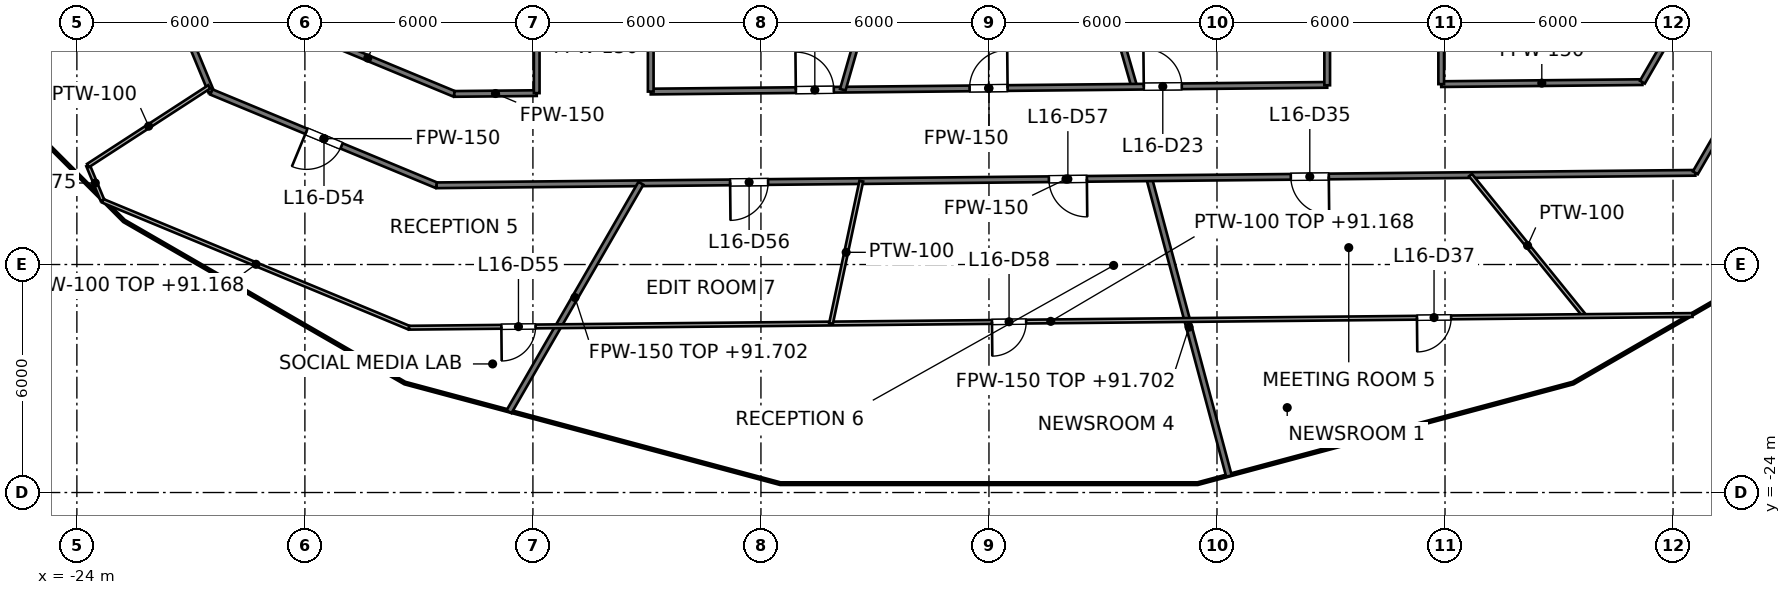
"""IFC4 building model, lengths in metres.
Left out: names, types, materials, properties, quantities, classifications, styles, units other than length and angle.
Written with IfcOpenShell. Run it as: python <this file> out.ifc"""

import sys

from ifc_helpers import new_model, si_unit, direction, frame, frame_2d, origin, place, context, subcontext, project, spatial, rectangle, extrude, element, fill, save


model = new_model("IFC4")
c1 = context("Model", 3, precision=1e-05, world=origin(), true_north=direction((0.0, 1.0)))
c2 = subcontext(c1, "Body", "Model", "MODEL_VIEW")
j1 = project(units=[si_unit("LENGTHUNIT", "METRE"), si_unit("PLANEANGLEUNIT", "RADIAN")], contexts=[c1])
p1 = place(None, origin())
s1 = spatial("IfcSite", under=j1, at=p1, CompositionType="ELEMENT")
p2 = place(p1, origin())
s2 = spatial("IfcBuilding", under=s1, at=p2, CompositionType="ELEMENT")
p3 = place(p2, frame((0.0, 0.0, 88.2)))
s3 = spatial("IfcBuildingStorey", under=s2, at=p3, CompositionType="ELEMENT", Elevation=88.2)
p4 = place(p3, frame((4.215, -15.73, 0.0), z_axis=(0.0, 0.0, 1.0), x_axis=(0.258844392232, -0.96591903419, 0.0)))
e1 = element("IfcWall", 1, at=p4, inside=s3, PredefinedType="PARTITIONING", context=c2, shape_type="SweptSolid", body=[
    extrude(rectangle(XDim=8.112, YDim=0.15, at=frame_2d((4.056, 0.0))), origin(), (0.0, 0.0, 1.0), 3.502),
])
p5 = place(p3, frame((2.296, -8.0, 0.0), z_axis=(0.0, 0.0, 1.0), x_axis=(0.275935525478, -0.961176147113, 0.0)))
e2 = element("IfcWall", 2, at=p5, inside=s3, PredefinedType="PARTITIONING", context=c2, shape_type="SweptSolid", body=[
    extrude(rectangle(XDim=5.548, YDim=0.15, at=frame_2d((2.774, 0.0))), origin(), (0.0, 0.0, 1.0), 3.9),
])
p6 = place(p3, frame((-22.9, -7.572, 0.0), z_axis=(0.0, 0.0, 1.0), x_axis=(0.382367581622, -0.924010298928, 0.0)))
e3 = element("IfcWall", 3, at=p6, inside=s3, PredefinedType="PARTITIONING", context=c2, shape_type="SweptSolid", body=[
    extrude(rectangle(XDim=6.374, YDim=0.15, at=frame_2d((3.187, 0.0))), origin(), (0.0, 0.0, 1.0), 2.977),
])
p7 = place(p6, frame((2.6, 0.0, 0.0)))
e4 = element("IfcOpeningElement", 4, at=p7, cuts=e3, PredefinedType="OPENING", context=c2, shape_type="SweptSolid", body=[
    extrude(rectangle(XDim=1.0, YDim=2.1, at=frame_2d((0.5, 1.05))), frame((0.0, 0.075, 0.0), z_axis=(0.0, -1.0, 0.0), x_axis=(1.0, 0.0, 0.0)), (0.0, 0.0, 1.0), 0.15),
])
p8 = place(p3, frame((-20.46, -13.46, 0.0), z_axis=(0.0, 0.0, 1.0), x_axis=(0.923801547606, -0.382871650349, 0.0)))
e5 = element("IfcWall", 5, at=p8, inside=s3, PredefinedType="PARTITIONING", context=c2, shape_type="SweptSolid", body=[
    extrude(rectangle(XDim=6.415, YDim=0.15, at=frame_2d((3.208, 0.0))), origin(), (0.0, 0.0, 1.0), 2.968),
])
p9 = place(p8, frame((2.707, 0.0, 0.0)))
e6 = element("IfcOpeningElement", 6, at=p9, cuts=e5, PredefinedType="OPENING", context=c2, shape_type="SweptSolid", body=[
    extrude(rectangle(XDim=1.0, YDim=2.1, at=frame_2d((0.5, 1.05))), frame((0.0, 0.075, 0.0), z_axis=(0.0, -1.0, 0.0), x_axis=(1.0, 0.0, 0.0)), (0.0, 0.0, 1.0), 0.15),
])
p10 = place(p3, frame((-18.623, -11.623, 0.0), z_axis=(0.0, 0.0, 1.0), x_axis=(0.923791670587, -0.38289548098, 0.0)))
e7 = element("IfcWall", 7, at=p10, inside=s3, PredefinedType="PARTITIONING", context=c2, shape_type="SweptSolid", body=[
    extrude(rectangle(XDim=4.931, YDim=0.15, at=frame_2d((2.465, 0.0))), origin(), (0.0, 0.0, 1.0), 2.968),
])
p11 = place(p3, frame((-14.534, -15.916, 0.0), z_axis=(0.0, 0.0, 1.0), x_axis=(0.999950930262, 0.009906415532, 0.0)))
e8 = element("IfcWall", 8, at=p11, inside=s3, PredefinedType="PARTITIONING", context=c2, shape_type="SweptSolid", body=[
    extrude(rectangle(XDim=33.123, YDim=0.15, at=frame_2d((16.561, 0.0))), origin(), (0.0, 0.0, 1.0), 2.968),
])
p12 = place(p11, frame((22.477, 0.0, 0.0)))
e9 = element("IfcOpeningElement", 9, at=p12, cuts=e8, PredefinedType="OPENING", context=c2, shape_type="SweptSolid", body=[
    extrude(rectangle(XDim=1.0, YDim=2.1, at=frame_2d((0.5, 1.05))), frame((0.0, 0.075, 0.0), z_axis=(0.0, -1.0, 0.0), x_axis=(1.0, 0.0, 0.0)), (0.0, 0.0, 1.0), 0.15),
])
p13 = place(p11, frame((7.723, 0.0, 0.0)))
e10 = element("IfcOpeningElement", 10, at=p13, cuts=e8, PredefinedType="OPENING", context=c2, shape_type="SweptSolid", body=[
    extrude(rectangle(XDim=1.0, YDim=2.1, at=frame_2d((0.5, 1.05))), frame((0.0, 0.075, 0.0), z_axis=(0.0, -1.0, 0.0), x_axis=(1.0, 0.0, 0.0)), (0.0, 0.0, 1.0), 0.15),
])
p14 = place(p11, frame((16.111, 0.0, 0.0)))
e11 = element("IfcOpeningElement", 11, at=p14, cuts=e8, PredefinedType="OPENING", context=c2, shape_type="SweptSolid", body=[
    extrude(rectangle(XDim=1.0, YDim=2.1, at=frame_2d((0.5, 1.05))), frame((0.0, 0.075, 0.0), z_axis=(0.0, -1.0, 0.0), x_axis=(1.0, 0.0, 0.0)), (0.0, 0.0, 1.0), 0.15),
])
p15 = place(p3, frame((-14.068, -13.511, 0.0), z_axis=(0.0, 0.0, 1.0), x_axis=(0.999950911515, 0.009908307647, 0.0)))
e12 = element("IfcWall", 12, at=p15, inside=s3, PredefinedType="PARTITIONING", context=c2, shape_type="SweptSolid", body=[
    extrude(rectangle(XDim=2.168, YDim=0.15, at=frame_2d((1.084, 0.0))), origin(), (0.0, 0.0, 1.0), 2.968),
])
p16 = place(p3, frame((-8.9, -13.449, 0.0), z_axis=(0.0, 0.0, 1.0), x_axis=(0.999950834077, 0.009916119672, 0.0)))
e13 = element("IfcWall", 13, at=p16, inside=s3, PredefinedType="PARTITIONING", context=c2, shape_type="SweptSolid", body=[
    extrude(rectangle(XDim=17.801, YDim=0.15, at=frame_2d((8.9, 0.0))), origin(), (0.0, 0.0, 1.0), 2.968),
])
p17 = place(p16, frame((3.818, 0.0, 0.0)))
e14 = element("IfcOpeningElement", 14, at=p17, cuts=e13, PredefinedType="OPENING", context=c2, shape_type="SweptSolid", body=[
    extrude(rectangle(XDim=1.0, YDim=2.1, at=frame_2d((0.5, 1.05))), frame((0.0, 0.075, 0.0), z_axis=(0.0, -1.0, 0.0), x_axis=(1.0, 0.0, 0.0)), (0.0, 0.0, 1.0), 0.15),
])
p18 = place(p16, frame((8.391, 0.0, 0.0)))
e15 = element("IfcOpeningElement", 15, at=p18, cuts=e13, PredefinedType="OPENING", context=c2, shape_type="SweptSolid", body=[
    extrude(rectangle(XDim=1.0, YDim=2.1, at=frame_2d((0.5, 1.05))), frame((0.0, 0.075, 0.0), z_axis=(0.0, -1.0, 0.0), x_axis=(1.0, 0.0, 0.0)), (0.0, 0.0, 1.0), 0.15),
])
p19 = place(p16, frame((12.975, 0.0, 0.0)))
e16 = element("IfcOpeningElement", 16, at=p19, cuts=e13, PredefinedType="OPENING", context=c2, shape_type="SweptSolid", body=[
    extrude(rectangle(XDim=1.0, YDim=2.1, at=frame_2d((0.5, 1.05))), frame((0.0, 0.075, 0.0), z_axis=(0.0, -1.0, 0.0), x_axis=(1.0, 0.0, 0.0)), (0.0, 0.0, 1.0), 0.15),
])
p20 = place(p3, frame((11.9, -13.253, 0.0), z_axis=(0.0, 0.0, 1.0), x_axis=(0.999950853109, 0.009914200296, 0.0)))
e17 = element("IfcWall", 17, at=p20, inside=s3, PredefinedType="PARTITIONING", context=c2, shape_type="SweptSolid", body=[
    extrude(rectangle(XDim=5.294, YDim=0.15, at=frame_2d((2.647, 0.0))), origin(), (0.0, 0.0, 1.0), 2.968),
])
p21 = place(p3, frame((18.587, -15.587, 0.0), z_axis=(0.0, 0.0, 1.0), x_axis=(0.500026433136, 0.866010142069, 0.0)))
e18 = element("IfcWall", 18, at=p21, inside=s3, PredefinedType="PARTITIONING", context=c2, shape_type="SweptSolid", body=[
    extrude(rectangle(XDim=8.713, YDim=0.15, at=frame_2d((4.357, 0.0))), origin(), (0.0, 0.0, 1.0), 2.968),
])
p22 = place(p21, frame((3.807, 0.0, 0.0)))
e19 = element("IfcOpeningElement", 19, at=p22, cuts=e18, PredefinedType="OPENING", context=c2, shape_type="SweptSolid", body=[
    extrude(rectangle(XDim=1.0, YDim=2.1, at=frame_2d((0.5, 1.05))), frame((0.0, 0.075, 0.0), z_axis=(0.0, -1.0, 0.0), x_axis=(1.0, 0.0, 0.0)), (0.0, 0.0, 1.0), 0.15),
])
p23 = place(p3, frame((17.194, -13.201, 0.0), z_axis=(0.0, 0.0, 1.0), x_axis=(0.50001062018, 0.866019272134, 0.0)))
e20 = element("IfcWall", 20, at=p23, inside=s3, PredefinedType="PARTITIONING", context=c2, shape_type="SweptSolid", body=[
    extrude(rectangle(XDim=6.674, YDim=0.15, at=frame_2d((3.337, 0.0))), origin(), (0.0, 0.0, 1.0), 2.968),
])
p24 = place(p23, frame((2.833, 0.0, 0.0)))
e21 = element("IfcOpeningElement", 21, at=p24, cuts=e20, PredefinedType="OPENING", context=c2, shape_type="SweptSolid", body=[
    extrude(rectangle(XDim=1.0, YDim=2.1, at=frame_2d((0.5, 1.05))), frame((0.0, 0.075, 0.0), z_axis=(0.0, -1.0, 0.0), x_axis=(1.0, 0.0, 0.0)), (0.0, 0.0, 1.0), 0.15),
])
p25 = place(p3, frame((-12.629, -21.874, 0.0), z_axis=(0.0, 0.0, 1.0), x_axis=(0.499986326517, 0.86603329803, 0.0)))
e22 = element("IfcWall", 22, at=p25, inside=s3, PredefinedType="PARTITIONING", context=c2, shape_type="SweptSolid", body=[
    extrude(rectangle(XDim=6.941, YDim=0.15, at=frame_2d((3.471, 0.0))), origin(), (0.0, 0.0, 1.0), 3.502),
])
p26 = place(p3, frame((-3.846, -13.399, 0.0), z_axis=(0.0, 0.0, 1.0), x_axis=(0.275914969745, 0.961182048038, 0.0)))
e23 = element("IfcWall", 23, at=p26, inside=s3, PredefinedType="PARTITIONING", context=c2, shape_type="SweptSolid", body=[
    extrude(rectangle(XDim=5.617, YDim=0.15, at=frame_2d((2.809, 0.0))), origin(), (0.0, 0.0, 1.0), 3.9),
])
p27 = place(p3, frame((11.9, -13.253, 0.0), z_axis=(0.0, 0.0, 1.0), x_axis=(0.0, 1.0, 0.0)))
e24 = element("IfcWall", 24, at=p27, inside=s3, PredefinedType="PARTITIONING", context=c2, shape_type="SweptSolid", body=[
    extrude(rectangle(XDim=5.253, YDim=0.15, at=frame_2d((2.626, 0.0))), origin(), (0.0, 0.0, 1.0), 2.968),
])
p28 = place(p3, frame((8.9, -13.283, 0.0), z_axis=(0.0, 0.0, 1.0), x_axis=(0.0, 1.0, 0.0)))
e25 = element("IfcWall", 25, at=p28, inside=s3, PredefinedType="PARTITIONING", context=c2, shape_type="SweptSolid", body=[
    extrude(rectangle(XDim=5.283, YDim=0.15, at=frame_2d((2.642, 0.0))), origin(), (0.0, 0.0, 1.0), 2.968),
])
p29 = place(p3, frame((-8.9, -13.449, 0.0), z_axis=(0.0, 0.0, 1.0), x_axis=(0.0, 1.0, 0.0)))
e26 = element("IfcWall", 26, at=p29, inside=s3, PredefinedType="PARTITIONING", context=c2, shape_type="SweptSolid", body=[
    extrude(rectangle(XDim=5.449, YDim=0.15, at=frame_2d((2.725, 0.0))), origin(), (0.0, 0.0, 1.0), 2.968),
])
p30 = place(p3, frame((-11.9, -13.49, 0.0), z_axis=(0.0, 0.0, 1.0), x_axis=(0.0, 1.0, 0.0)))
e27 = element("IfcWall", 27, at=p30, inside=s3, PredefinedType="PARTITIONING", context=c2, shape_type="SweptSolid", body=[
    extrude(rectangle(XDim=5.49, YDim=0.15, at=frame_2d((2.745, 0.0))), origin(), (0.0, 0.0, 1.0), 2.968),
])
p31 = place(p30, frame((2.245, 0.0, 0.0)))
e28 = element("IfcOpeningElement", 28, at=p31, cuts=e27, PredefinedType="OPENING", context=c2, shape_type="SweptSolid", body=[
    extrude(rectangle(XDim=1.0, YDim=2.1, at=frame_2d((0.5, 1.05))), frame((0.0, 0.075, 0.0), z_axis=(0.0, -1.0, 0.0), x_axis=(1.0, 0.0, 0.0)), (0.0, 0.0, 1.0), 0.15),
])
p32 = place(p3, frame((-23.706, -15.395, 0.0), z_axis=(0.0, 0.0, 1.0), x_axis=(0.382734348683, -0.923858440638, 0.0)))
e29 = element("IfcWall", 29, at=p32, inside=s3, PredefinedType="PARTITIONING", context=c2, shape_type="SweptSolid", body=[
    extrude(rectangle(XDim=0.996, YDim=0.1, at=frame_2d((0.498, 0.0))), origin(), (0.0, 0.0, 1.0), 3.675),
])
p33 = place(p3, frame((12.67, -15.646, 0.0), z_axis=(0.0, 0.0, 1.0), x_axis=(0.629429152062, -0.777057875923, 0.0)))
e30 = element("IfcWall", 30, at=p33, inside=s3, PredefinedType="PARTITIONING", context=c2, shape_type="SweptSolid", body=[
    extrude(rectangle(XDim=4.774, YDim=0.1, at=frame_2d((2.387, 0.0))), origin(), (0.0, 0.0, 1.0), 3.9),
])
p34 = place(p3, frame((-23.315, -16.325, 0.0), z_axis=(0.0, 0.0, 1.0), x_axis=(0.923811686722, -0.382847185541, 0.0)))
e31 = element("IfcWall", 31, at=p34, inside=s3, PredefinedType="PARTITIONING", context=c2, shape_type="SweptSolid", body=[
    extrude(rectangle(XDim=8.719, YDim=0.1, at=frame_2d((4.36, 0.0))), origin(), (0.0, 0.0, 1.0), 2.968),
])
p35 = place(p3, frame((-15.26, -19.663, 0.0), z_axis=(0.0, 0.0, 1.0), x_axis=(0.999951032014, 0.009896139397, 0.0)))
e32 = element("IfcWall", 32, at=p35, inside=s3, PredefinedType="PARTITIONING", context=c2, shape_type="SweptSolid", body=[
    extrude(rectangle(XDim=33.774, YDim=0.1, at=frame_2d((16.887, 0.0))), origin(), (0.0, 0.0, 1.0), 2.968),
])
p36 = place(p35, frame((26.523, 0.0, 0.0)))
e33 = element("IfcOpeningElement", 33, at=p36, cuts=e32, PredefinedType="OPENING", context=c2, shape_type="SweptSolid", body=[
    extrude(rectangle(XDim=0.9, YDim=2.1, at=frame_2d((0.45, 1.05))), frame((0.0, 0.05, 0.0), z_axis=(0.0, -1.0, 0.0), x_axis=(1.0, 0.0, 0.0)), (0.0, 0.0, 1.0), 0.1),
])
p37 = place(p35, frame((2.43, 0.0, 0.0)))
e34 = element("IfcOpeningElement", 34, at=p37, cuts=e32, PredefinedType="OPENING", context=c2, shape_type="SweptSolid", body=[
    extrude(rectangle(XDim=0.9, YDim=2.1, at=frame_2d((0.45, 1.05))), frame((0.0, 0.05, 0.0), z_axis=(0.0, -1.0, 0.0), x_axis=(1.0, 0.0, 0.0)), (0.0, 0.0, 1.0), 0.1),
])
p38 = place(p35, frame((15.34, 0.0, 0.0)))
e35 = element("IfcOpeningElement", 35, at=p38, cuts=e32, PredefinedType="OPENING", context=c2, shape_type="SweptSolid", body=[
    extrude(rectangle(XDim=0.9, YDim=2.1, at=frame_2d((0.45, 1.05))), frame((0.0, 0.05, 0.0), z_axis=(0.0, -1.0, 0.0), x_axis=(1.0, 0.0, 0.0)), (0.0, 0.0, 1.0), 0.1),
])
p39 = place(p3, frame((-23.706, -15.395, 0.0), z_axis=(0.0, 0.0, 1.0), x_axis=(0.838733884708, 0.544541523341, 0.0)))
e36 = element("IfcWall", 36, at=p39, inside=s3, PredefinedType="PARTITIONING", context=c2, shape_type="SweptSolid", body=[
    extrude(rectangle(XDim=3.803, YDim=0.1, at=frame_2d((1.902, 0.0))), origin(), (0.0, 0.0, 1.0), 3.9),
])
p40 = place(p3, frame((-4.156, -19.553, 0.0), z_axis=(0.0, 0.0, 1.0), x_axis=(0.208023345905, 0.978123861052, 0.0)))
e37 = element("IfcWall", 37, at=p40, inside=s3, PredefinedType="PARTITIONING", context=c2, shape_type="SweptSolid", body=[
    extrude(rectangle(XDim=3.832, YDim=0.1, at=frame_2d((1.916, 0.0))), origin(), (0.0, 0.0, 1.0), 3.9),
])
p41 = place(p17, origin())
e38 = element("IfcDoor", 38, at=p41, inside=s3, OperationType="SINGLE_SWING_LEFT", PredefinedType="DOOR", context=c2, shape_type="SweptSolid", body=[
    extrude(rectangle(XDim=1.0, YDim=2.1, at=frame_2d((0.5, 1.05))), frame((0.0, 0.025, 0.0), z_axis=(0.0, -1.0, 0.0), x_axis=(1.0, 0.0, 0.0)), (0.0, 0.0, 1.0), 0.05),
])
fill(e14, e38)
p42 = place(p18, origin())
e39 = element("IfcDoor", 39, at=p42, inside=s3, OperationType="SINGLE_SWING_RIGHT", PredefinedType="DOOR", context=c2, shape_type="SweptSolid", body=[
    extrude(rectangle(XDim=1.0, YDim=2.1, at=frame_2d((0.5, 1.05))), frame((0.0, 0.025, 0.0), z_axis=(0.0, -1.0, 0.0), x_axis=(1.0, 0.0, 0.0)), (0.0, 0.0, 1.0), 0.05),
])
fill(e15, e39)
p43 = place(p19, origin())
e40 = element("IfcDoor", 40, at=p43, inside=s3, OperationType="SINGLE_SWING_LEFT", PredefinedType="DOOR", context=c2, shape_type="SweptSolid", body=[
    extrude(rectangle(XDim=1.0, YDim=2.1, at=frame_2d((0.5, 1.05))), frame((0.0, 0.025, 0.0), z_axis=(0.0, -1.0, 0.0), x_axis=(1.0, 0.0, 0.0)), (0.0, 0.0, 1.0), 0.05),
])
fill(e16, e40)
p44 = place(p12, origin())
e41 = element("IfcDoor", 41, at=p44, inside=s3, OperationType="SINGLE_SWING_RIGHT", PredefinedType="DOOR", context=c2, shape_type="SweptSolid", body=[
    extrude(rectangle(XDim=1.0, YDim=2.1, at=frame_2d((0.5, 1.05))), frame((0.0, 0.025, 0.0), z_axis=(0.0, -1.0, 0.0), x_axis=(1.0, 0.0, 0.0)), (0.0, 0.0, 1.0), 0.05),
])
fill(e9, e41)
p45 = place(p36, origin())
e42 = element("IfcDoor", 42, at=p45, inside=s3, OperationType="SINGLE_SWING_LEFT", PredefinedType="DOOR", context=c2, shape_type="SweptSolid", body=[
    extrude(rectangle(XDim=0.9, YDim=2.1, at=frame_2d((0.45, 1.05))), frame((0.0, 0.025, 0.0), z_axis=(0.0, -1.0, 0.0), x_axis=(1.0, 0.0, 0.0)), (0.0, 0.0, 1.0), 0.05),
])
fill(e33, e42)
p46 = place(p9, origin())
e43 = element("IfcDoor", 43, at=p46, inside=s3, OperationType="SINGLE_SWING_LEFT", PredefinedType="DOOR", context=c2, shape_type="SweptSolid", body=[
    extrude(rectangle(XDim=1.0, YDim=2.1, at=frame_2d((0.5, 1.05))), frame((0.0, 0.025, 0.0), z_axis=(0.0, -1.0, 0.0), x_axis=(1.0, 0.0, 0.0)), (0.0, 0.0, 1.0), 0.05),
])
fill(e6, e43)
p47 = place(p37, origin())
e44 = element("IfcDoor", 44, at=p47, inside=s3, OperationType="SINGLE_SWING_LEFT", PredefinedType="DOOR", context=c2, shape_type="SweptSolid", body=[
    extrude(rectangle(XDim=0.9, YDim=2.1, at=frame_2d((0.45, 1.05))), frame((0.0, 0.025, 0.0), z_axis=(0.0, -1.0, 0.0), x_axis=(1.0, 0.0, 0.0)), (0.0, 0.0, 1.0), 0.05),
])
fill(e34, e44)
p48 = place(p13, origin())
e45 = element("IfcDoor", 45, at=p48, inside=s3, OperationType="SINGLE_SWING_LEFT", PredefinedType="DOOR", context=c2, shape_type="SweptSolid", body=[
    extrude(rectangle(XDim=1.0, YDim=2.1, at=frame_2d((0.5, 1.05))), frame((0.0, 0.025, 0.0), z_axis=(0.0, -1.0, 0.0), x_axis=(1.0, 0.0, 0.0)), (0.0, 0.0, 1.0), 0.05),
])
fill(e10, e45)
p49 = place(p14, origin())
e46 = element("IfcDoor", 46, at=p49, inside=s3, OperationType="SINGLE_SWING_RIGHT", PredefinedType="DOOR", context=c2, shape_type="SweptSolid", body=[
    extrude(rectangle(XDim=1.0, YDim=2.1, at=frame_2d((0.5, 1.05))), frame((0.0, 0.025, 0.0), z_axis=(0.0, -1.0, 0.0), x_axis=(1.0, 0.0, 0.0)), (0.0, 0.0, 1.0), 0.05),
])
fill(e11, e46)
p50 = place(p38, origin())
e47 = element("IfcDoor", 47, at=p50, inside=s3, OperationType="SINGLE_SWING_LEFT", PredefinedType="DOOR", context=c2, shape_type="SweptSolid", body=[
    extrude(rectangle(XDim=0.9, YDim=2.1, at=frame_2d((0.45, 1.05))), frame((0.0, 0.025, 0.0), z_axis=(0.0, -1.0, 0.0), x_axis=(1.0, 0.0, 0.0)), (0.0, 0.0, 1.0), 0.05),
])
fill(e35, e47)
save(model, sys.argv[1])
